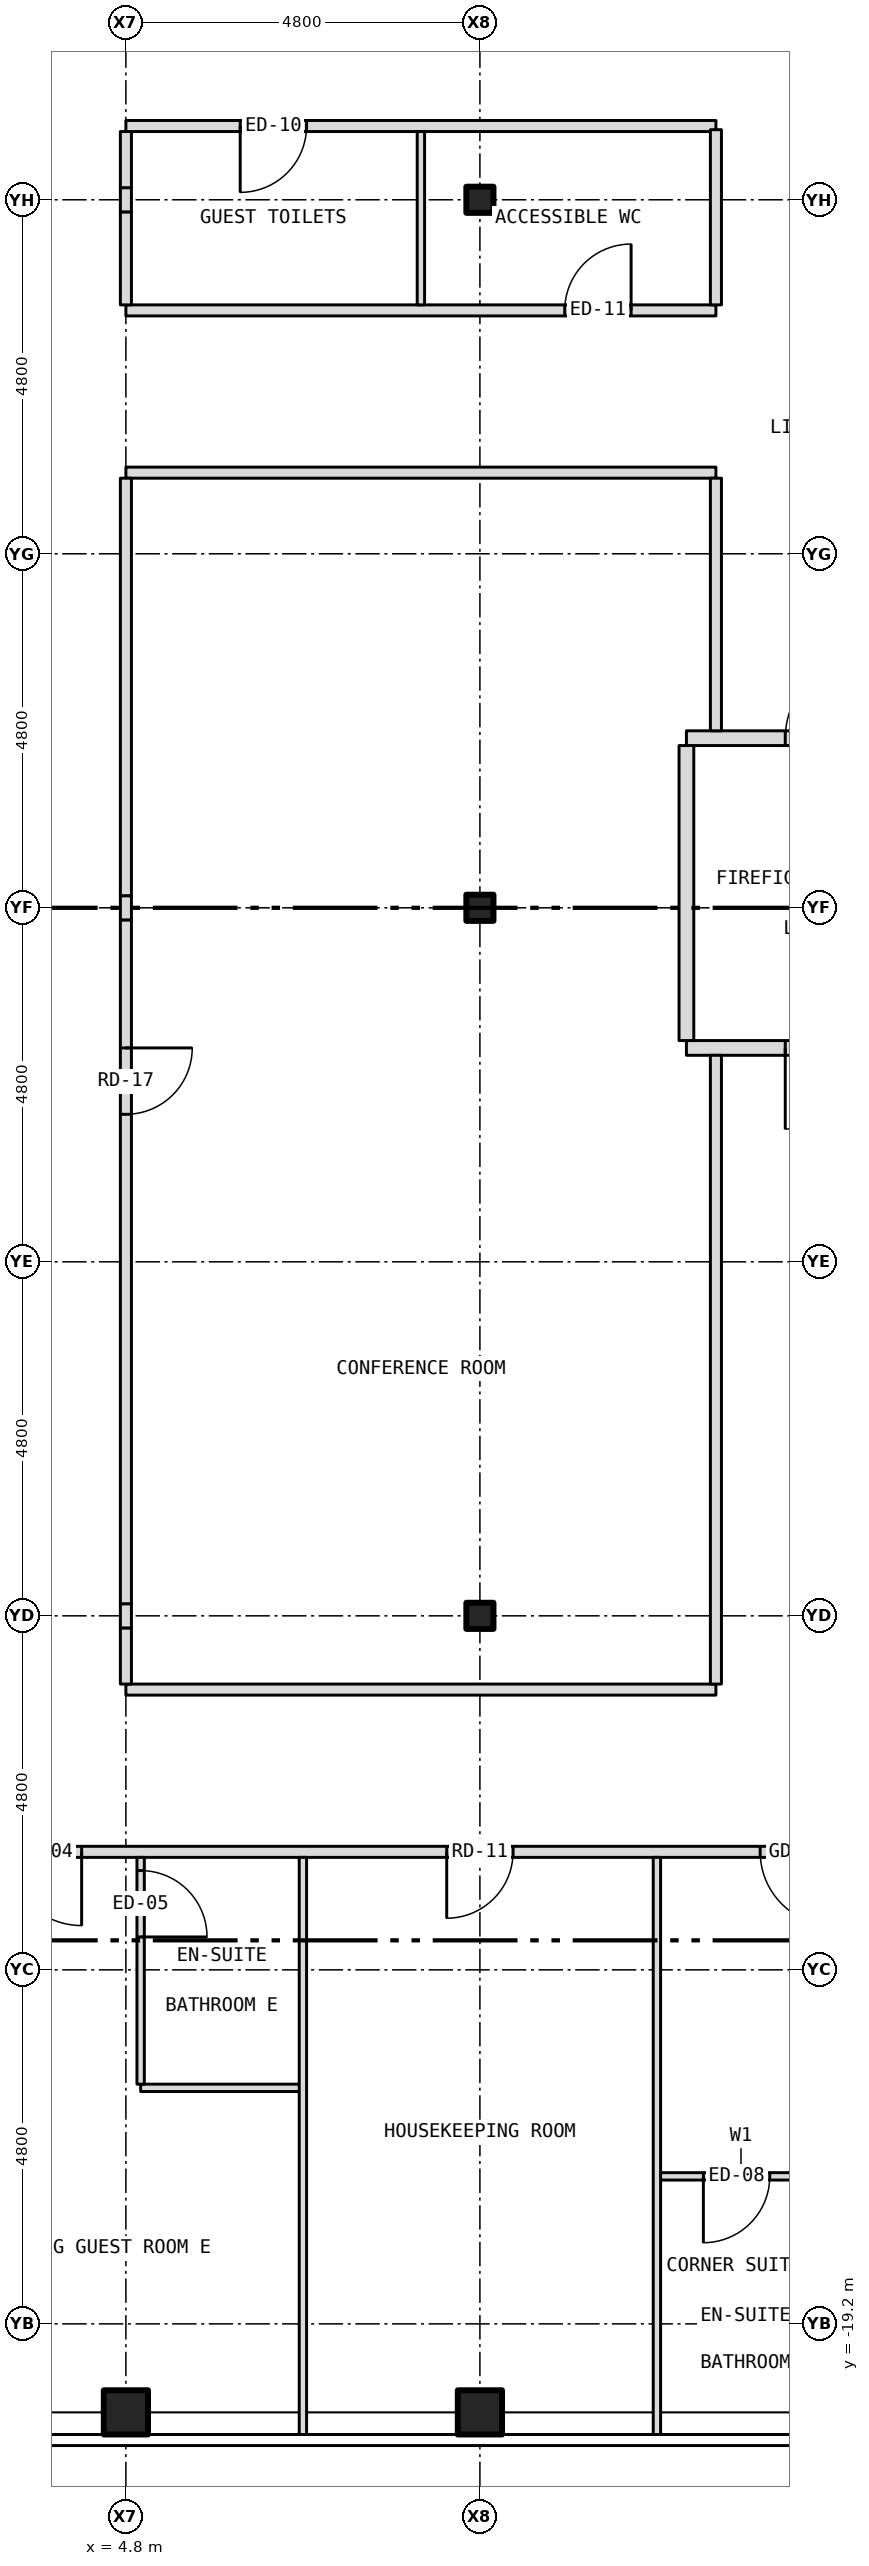
"""IFC4 building model, lengths in metres.
Left out: names, types, materials, properties, quantities, classifications, styles, units other than length and angle.
Written with IfcOpenShell. Run it as: python <this file> out.ifc"""

import sys

from ifc_helpers import new_model, si_unit, direction, frame, frame_2d, origin, origin_2d, place, context, subcontext, project, spatial, rectangle, hollow_rectangle, i_section, extrude, element, fill, save


model = new_model("IFC4")
c1 = context("Model", 3, precision=1e-05, world=origin(), true_north=direction((0.0, 1.0)))
c2 = subcontext(c1, "Body", "Model", "MODEL_VIEW")
j1 = project(units=[si_unit("LENGTHUNIT", "METRE"), si_unit("PLANEANGLEUNIT", "RADIAN")], contexts=[c1])
p1 = place(None, origin())
s1 = spatial("IfcSite", under=j1, at=p1, CompositionType="ELEMENT")
p2 = place(p1, origin())
s2 = spatial("IfcBuilding", under=s1, at=p2, CompositionType="ELEMENT")
p3 = place(p2, frame((0.0, 0.0, 255.0)))
s3 = spatial("IfcBuildingStorey", under=s2, at=p3, CompositionType="ELEMENT", Elevation=255.0)
for number, where, z_axis, x_axis in (
    (1, (4.8, -20.4, -0.15), (0.0, 0.0, 1.0), (1.0, 0.0, 0.0)),
    (2, (9.6, -20.4, -0.15), (0.0, 0.0, 1.0), (1.0, 0.0, 0.0)),
):
    element("IfcColumn", number, at=place(p3, frame(where, z_axis=z_axis, x_axis=x_axis)), inside=s3, PredefinedType="COLUMN", context=c2, shape_type="SweptSolid", body=[
        extrude(hollow_rectangle(XDim=0.6, YDim=0.6, WallThickness=0.03, at=origin_2d()), origin(), (0.0, 0.0, 1.0), 3.5),
    ])
for number, where, z_axis, x_axis in (
    (3, (9.6, -9.6, -0.15), (0.0, 0.0, 1.0), (1.0, 0.0, 0.0)),
    (4, (9.6, 0.0, -0.15), (0.0, 0.0, 1.0), (1.0, 0.0, 0.0)),
    (5, (9.6, 9.6, -0.15), (0.0, 0.0, 1.0), (1.0, 0.0, 0.0)),
):
    element("IfcColumn", number, at=place(p3, frame(where, z_axis=z_axis, x_axis=x_axis)), inside=s3, PredefinedType="COLUMN", context=c2, shape_type="SweptSolid", body=[
        extrude(i_section(OverallWidth=0.368, OverallDepth=0.356, WebThickness=0.011, FlangeThickness=0.018, at=origin_2d()), origin(), (0.0, 0.0, 1.0), 3.5),
    ])
p4 = place(p3, frame((12.0, -17.2, 0.0), z_axis=(0.0, 0.0, 1.0), x_axis=(1.0, 0.0, 0.0)))
e6 = element("IfcWall", 6, at=p4, inside=s3, PredefinedType="PARTITIONING", context=c2, shape_type="SweptSolid", body=[
    extrude(rectangle(XDim=2.28, YDim=0.1, at=frame_2d((1.14, 0.0))), origin(), (0.0, 0.0, 1.0), 3.35),
])
p5 = place(p4, frame((0.63, 0.0, 0.0)))
e7 = element("IfcOpeningElement", 7, at=p5, cuts=e6, PredefinedType="OPENING", context=c2, shape_type="SweptSolid", body=[
    extrude(rectangle(XDim=0.9, YDim=2.1, at=frame_2d((0.45, 1.05))), frame((0.0, 0.062, 0.0), z_axis=(0.0, -1.0, 0.0), x_axis=(1.0, 0.0, 0.0)), (0.0, 0.0, 1.0), 0.124),
])
p6 = place(p3, frame((5.0, -16.0, 0.0), z_axis=(0.0, 0.0, 1.0), x_axis=(1.0, 0.0, 0.0)))
e8 = element("IfcWall", 8, at=p6, inside=s3, PredefinedType="PARTITIONING", context=c2, shape_type="SweptSolid", body=[
    extrude(rectangle(XDim=2.2, YDim=0.1, at=frame_2d((1.1, 0.0))), origin(), (0.0, 0.0, 1.0), 3.35),
])
p7 = place(p3, frame((-15.8, -12.8, 0.0), z_axis=(0.0, 0.0, 1.0), x_axis=(1.0, 0.0, 0.0)))
e9 = element("IfcWall", 9, at=p7, inside=s3, PredefinedType="PARTITIONING", context=c2, shape_type="SweptSolid", body=[
    extrude(rectangle(XDim=31.6, YDim=0.15, at=frame_2d((15.8, 0.0))), origin(), (0.0, 0.0, 1.0), 3.35),
])
p8 = place(p7, frame((10.55, 0.0, 0.0)))
e10 = element("IfcOpeningElement", 10, at=p8, cuts=e9, PredefinedType="OPENING", context=c2, shape_type="SweptSolid", body=[
    extrude(rectangle(XDim=0.9, YDim=2.1, at=frame_2d((0.45, 1.05))), frame((0.0, 0.087, 0.0), z_axis=(0.0, -1.0, 0.0), x_axis=(1.0, 0.0, 0.0)), (0.0, 0.0, 1.0), 0.174),
])
p9 = place(p7, frame((19.0, 0.0, 0.0)))
e11 = element("IfcOpeningElement", 11, at=p9, cuts=e9, PredefinedType="OPENING", context=c2, shape_type="SweptSolid", body=[
    extrude(rectangle(XDim=1.0, YDim=2.1, at=frame_2d((0.5, 1.05))), frame((0.0, 0.087, 0.0), z_axis=(0.0, -1.0, 0.0), x_axis=(1.0, 0.0, 0.0)), (0.0, 0.0, 1.0), 0.174),
])
p10 = place(p7, frame((24.95, 0.0, 0.0)))
e12 = element("IfcOpeningElement", 12, at=p10, cuts=e9, PredefinedType="OPENING", context=c2, shape_type="SweptSolid", body=[
    extrude(rectangle(XDim=0.9, YDim=2.1, at=frame_2d((0.45, 1.05))), frame((0.0, 0.087, 0.0), z_axis=(0.0, -1.0, 0.0), x_axis=(1.0, 0.0, 0.0)), (0.0, 0.0, 1.0), 0.174),
])
p11 = place(p7, frame((1.4, 0.0, 0.0)))
e13 = element("IfcOpeningElement", 13, at=p11, cuts=e9, PredefinedType="OPENING", context=c2, shape_type="SweptSolid", body=[
    extrude(rectangle(XDim=1.0, YDim=2.1, at=frame_2d((0.5, 1.05))), frame((0.0, 0.087, 0.0), z_axis=(0.0, -1.0, 0.0), x_axis=(1.0, 0.0, 0.0)), (0.0, 0.0, 1.0), 0.174),
])
p12 = place(p7, frame((29.2, 0.0, 0.0)))
e14 = element("IfcOpeningElement", 14, at=p12, cuts=e9, PredefinedType="OPENING", context=c2, shape_type="SweptSolid", body=[
    extrude(rectangle(XDim=1.0, YDim=2.1, at=frame_2d((0.5, 1.05))), frame((0.0, 0.087, 0.0), z_axis=(0.0, -1.0, 0.0), x_axis=(1.0, 0.0, 0.0)), (0.0, 0.0, 1.0), 0.174),
])
p13 = place(p3, frame((4.8, -10.6, 0.0), z_axis=(0.0, 0.0, 1.0), x_axis=(1.0, 0.0, 0.0)))
e15 = element("IfcWall", 15, at=p13, inside=s3, PredefinedType="PARTITIONING", context=c2, shape_type="SweptSolid", body=[
    extrude(rectangle(XDim=8.0, YDim=0.15, at=frame_2d((4.0, 0.0))), origin(), (0.0, 0.0, 1.0), 3.35),
])
p14 = place(p3, frame((12.4, -1.9, 0.0), z_axis=(0.0, 0.0, 1.0), x_axis=(1.0, 0.0, 0.0)))
e16 = element("IfcWall", 16, at=p14, inside=s3, PredefinedType="PARTITIONING", context=c2, shape_type="SweptSolid", body=[
    extrude(rectangle(XDim=3.28, YDim=0.2, at=frame_2d((1.64, 0.0))), origin(), (0.0, 0.0, 1.0), 3.35),
])
p15 = place(p14, frame((1.34, 0.0, 0.0)))
e17 = element("IfcOpeningElement", 17, at=p15, cuts=e16, PredefinedType="OPENING", context=c2, shape_type="SweptSolid", body=[
    extrude(rectangle(XDim=1.1, YDim=2.1, at=frame_2d((0.55, 1.05))), frame((0.0, 0.112, 0.0), z_axis=(0.0, -1.0, 0.0), x_axis=(1.0, 0.0, 0.0)), (0.0, 0.0, 1.0), 0.224),
])
p16 = place(p3, frame((12.4, 2.3, 0.0), z_axis=(0.0, 0.0, 1.0), x_axis=(1.0, 0.0, 0.0)))
e18 = element("IfcWall", 18, at=p16, inside=s3, PredefinedType="PARTITIONING", context=c2, shape_type="SweptSolid", body=[
    extrude(rectangle(XDim=3.28, YDim=0.2, at=frame_2d((1.64, 0.0))), origin(), (0.0, 0.0, 1.0), 3.35),
])
p17 = place(p16, frame((1.34, 0.0, 0.0)))
e19 = element("IfcOpeningElement", 19, at=p17, cuts=e18, PredefinedType="OPENING", context=c2, shape_type="SweptSolid", body=[
    extrude(rectangle(XDim=1.1, YDim=2.1, at=frame_2d((0.55, 1.05))), frame((0.0, 0.112, 0.0), z_axis=(0.0, -1.0, 0.0), x_axis=(1.0, 0.0, 0.0)), (0.0, 0.0, 1.0), 0.224),
])
p18 = place(p3, frame((4.8, 5.9, 0.0), z_axis=(0.0, 0.0, 1.0), x_axis=(1.0, 0.0, 0.0)))
e20 = element("IfcWall", 20, at=p18, inside=s3, PredefinedType="PARTITIONING", context=c2, shape_type="SweptSolid", body=[
    extrude(rectangle(XDim=8.0, YDim=0.15, at=frame_2d((4.0, 0.0))), origin(), (0.0, 0.0, 1.0), 3.35),
])
p19 = place(p3, frame((4.8, 8.1, 0.0), z_axis=(0.0, 0.0, 1.0), x_axis=(1.0, 0.0, 0.0)))
e21 = element("IfcWall", 21, at=p19, inside=s3, PredefinedType="PARTITIONING", context=c2, shape_type="SweptSolid", body=[
    extrude(rectangle(XDim=8.0, YDim=0.15, at=frame_2d((4.0, 0.0))), origin(), (0.0, 0.0, 1.0), 3.35),
])
p20 = place(p19, frame((5.95, 0.0, 0.0)))
e22 = element("IfcOpeningElement", 22, at=p20, cuts=e21, PredefinedType="OPENING", context=c2, shape_type="SweptSolid", body=[
    extrude(rectangle(XDim=0.9, YDim=2.1, at=frame_2d((0.45, 1.05))), frame((0.0, 0.087, 0.0), z_axis=(0.0, -1.0, 0.0), x_axis=(1.0, 0.0, 0.0)), (0.0, 0.0, 1.0), 0.174),
])
p21 = place(p3, frame((4.8, 10.6, 0.0), z_axis=(0.0, 0.0, 1.0), x_axis=(1.0, 0.0, 0.0)))
e23 = element("IfcWall", 23, at=p21, inside=s3, PredefinedType="PARTITIONING", context=c2, shape_type="SweptSolid", body=[
    extrude(rectangle(XDim=8.0, YDim=0.15, at=frame_2d((4.0, 0.0))), origin(), (0.0, 0.0, 1.0), 3.35),
])
p22 = place(p21, frame((1.55, 0.0, 0.0)))
e24 = element("IfcOpeningElement", 24, at=p22, cuts=e23, PredefinedType="OPENING", context=c2, shape_type="SweptSolid", body=[
    extrude(rectangle(XDim=0.9, YDim=2.1, at=frame_2d((0.45, 1.05))), frame((0.0, 0.087, 0.0), z_axis=(0.0, -1.0, 0.0), x_axis=(1.0, 0.0, 0.0)), (0.0, 0.0, 1.0), 0.174),
])
p23 = place(p3, frame((4.8, -10.525, 0.0), z_axis=(0.0, 0.0, 1.0), x_axis=(0.0, 1.0, 0.0)))
e25 = element("IfcWall", 25, at=p23, inside=s3, PredefinedType="PARTITIONING", context=c2, shape_type="SweptSolid", body=[
    extrude(rectangle(XDim=0.761, YDim=0.15, at=frame_2d((0.38, 0.0))), origin(), (0.0, 0.0, 1.0), 2.817),
])
p24 = place(p3, frame((4.8, -9.764, 0.0), z_axis=(0.0, 0.0, 1.0), x_axis=(0.0, 1.0, 0.0)))
e26 = element("IfcWall", 26, at=p24, inside=s3, PredefinedType="PARTITIONING", context=c2, shape_type="SweptSolid", body=[
    extrude(rectangle(XDim=0.328, YDim=0.15, at=frame_2d((0.164, 0.0))), origin(), (0.0, 0.0, 1.0), 3.35),
])
p25 = place(p3, frame((4.8, -9.436, 0.0), z_axis=(0.0, 0.0, 1.0), x_axis=(0.0, 1.0, 0.0)))
e27 = element("IfcWall", 27, at=p25, inside=s3, PredefinedType="PARTITIONING", context=c2, shape_type="SweptSolid", body=[
    extrude(rectangle(XDim=9.272, YDim=0.15, at=frame_2d((4.636, 0.0))), origin(), (0.0, 0.0, 1.0), 2.817),
])
p26 = place(p25, frame((6.636, 0.0, 0.0)))
e28 = element("IfcOpeningElement", 28, at=p26, cuts=e27, PredefinedType="OPENING", context=c2, shape_type="SweptSolid", body=[
    extrude(rectangle(XDim=0.9, YDim=2.1, at=frame_2d((0.45, 1.05))), frame((0.0, 0.087, 0.0), z_axis=(0.0, -1.0, 0.0), x_axis=(1.0, 0.0, 0.0)), (0.0, 0.0, 1.0), 0.174),
])
p27 = place(p3, frame((4.8, -0.164, 0.0), z_axis=(0.0, 0.0, 1.0), x_axis=(0.0, 1.0, 0.0)))
e29 = element("IfcWall", 29, at=p27, inside=s3, PredefinedType="PARTITIONING", context=c2, shape_type="SweptSolid", body=[
    extrude(rectangle(XDim=0.328, YDim=0.15, at=frame_2d((0.164, 0.0))), origin(), (0.0, 0.0, 1.0), 3.35),
])
p28 = place(p3, frame((4.8, 0.164, 0.0), z_axis=(0.0, 0.0, 1.0), x_axis=(0.0, 1.0, 0.0)))
e30 = element("IfcWall", 30, at=p28, inside=s3, PredefinedType="PARTITIONING", context=c2, shape_type="SweptSolid", body=[
    extrude(rectangle(XDim=5.661, YDim=0.15, at=frame_2d((2.831, 0.0))), origin(), (0.0, 0.0, 1.0), 2.817),
])
p29 = place(p3, frame((4.8, 8.175, 0.0), z_axis=(0.0, 0.0, 1.0), x_axis=(0.0, 1.0, 0.0)))
e31 = element("IfcWall", 31, at=p29, inside=s3, PredefinedType="PARTITIONING", context=c2, shape_type="SweptSolid", body=[
    extrude(rectangle(XDim=1.261, YDim=0.15, at=frame_2d((0.63, 0.0))), origin(), (0.0, 0.0, 1.0), 2.817),
])
p30 = place(p3, frame((4.8, 9.436, 0.0), z_axis=(0.0, 0.0, 1.0), x_axis=(0.0, 1.0, 0.0)))
e32 = element("IfcWall", 32, at=p30, inside=s3, PredefinedType="PARTITIONING", context=c2, shape_type="SweptSolid", body=[
    extrude(rectangle(XDim=0.328, YDim=0.15, at=frame_2d((0.164, 0.0))), origin(), (0.0, 0.0, 1.0), 3.35),
])
p31 = place(p3, frame((4.8, 9.764, 0.0), z_axis=(0.0, 0.0, 1.0), x_axis=(0.0, 1.0, 0.0)))
e33 = element("IfcWall", 33, at=p31, inside=s3, PredefinedType="PARTITIONING", context=c2, shape_type="SweptSolid", body=[
    extrude(rectangle(XDim=0.761, YDim=0.15, at=frame_2d((0.38, 0.0))), origin(), (0.0, 0.0, 1.0), 2.817),
])
p32 = place(p3, frame((5.0, -15.95, 0.0), z_axis=(0.0, 0.0, 1.0), x_axis=(0.0, 1.0, 0.0)))
e34 = element("IfcWall", 34, at=p32, inside=s3, PredefinedType="PARTITIONING", context=c2, shape_type="SweptSolid", body=[
    extrude(rectangle(XDim=3.075, YDim=0.1, at=frame_2d((1.538, 0.0))), origin(), (0.0, 0.0, 1.0), 3.35),
])
p33 = place(p32, frame((1.996, 0.0, 0.0)))
e35 = element("IfcOpeningElement", 35, at=p33, cuts=e34, PredefinedType="OPENING", context=c2, shape_type="SweptSolid", body=[
    extrude(rectangle(XDim=0.9, YDim=2.1, at=frame_2d((0.45, 1.05))), frame((0.0, 0.062, 0.0), z_axis=(0.0, -1.0, 0.0), x_axis=(1.0, 0.0, 0.0)), (0.0, 0.0, 1.0), 0.124),
])
p34 = place(p3, frame((7.2, -20.73, 0.0), z_axis=(0.0, 0.0, 1.0), x_axis=(0.0, 1.0, 0.0)))
e36 = element("IfcWall", 36, at=p34, inside=s3, PredefinedType="PARTITIONING", context=c2, shape_type="SweptSolid", body=[
    extrude(rectangle(XDim=7.855, YDim=0.1, at=frame_2d((3.927, 0.0))), origin(), (0.0, 0.0, 1.0), 3.35),
])
p35 = place(p3, frame((8.8, 8.175, 0.0), z_axis=(0.0, 0.0, 1.0), x_axis=(0.0, 1.0, 0.0)))
e37 = element("IfcWall", 37, at=p35, inside=s3, PredefinedType="PARTITIONING", context=c2, shape_type="SweptSolid", body=[
    extrude(rectangle(XDim=2.35, YDim=0.1, at=frame_2d((1.175, 0.0))), origin(), (0.0, 0.0, 1.0), 3.35),
])
p36 = place(p3, frame((12.0, -20.73, 0.0), z_axis=(0.0, 0.0, 1.0), x_axis=(0.0, 1.0, 0.0)))
e38 = element("IfcWall", 38, at=p36, inside=s3, PredefinedType="PARTITIONING", context=c2, shape_type="SweptSolid", body=[
    extrude(rectangle(XDim=7.855, YDim=0.1, at=frame_2d((3.927, 0.0))), origin(), (0.0, 0.0, 1.0), 3.35),
])
p37 = place(p3, frame((12.4, -1.8, 0.0), z_axis=(0.0, 0.0, 1.0), x_axis=(0.0, 1.0, 0.0)))
e39 = element("IfcWall", 39, at=p37, inside=s3, PredefinedType="PARTITIONING", context=c2, shape_type="SweptSolid", body=[
    extrude(rectangle(XDim=4.0, YDim=0.2, at=frame_2d((2.0, 0.0))), origin(), (0.0, 0.0, 1.0), 3.35),
])
p38 = place(p3, frame((12.8, -10.525, 0.0), z_axis=(0.0, 0.0, 1.0), x_axis=(0.0, 1.0, 0.0)))
e40 = element("IfcWall", 40, at=p38, inside=s3, PredefinedType="PARTITIONING", context=c2, shape_type="SweptSolid", body=[
    extrude(rectangle(XDim=8.525, YDim=0.15, at=frame_2d((4.262, 0.0))), origin(), (0.0, 0.0, 1.0), 3.35),
])
p39 = place(p3, frame((12.8, 2.4, 0.0), z_axis=(0.0, 0.0, 1.0), x_axis=(0.0, 1.0, 0.0)))
e41 = element("IfcWall", 41, at=p39, inside=s3, PredefinedType="PARTITIONING", context=c2, shape_type="SweptSolid", body=[
    extrude(rectangle(XDim=3.425, YDim=0.15, at=frame_2d((1.712, 0.0))), origin(), (0.0, 0.0, 1.0), 3.35),
])
p40 = place(p3, frame((12.8, 8.175, 0.0), z_axis=(0.0, 0.0, 1.0), x_axis=(0.0, 1.0, 0.0)))
e42 = element("IfcWall", 42, at=p40, inside=s3, PredefinedType="PARTITIONING", context=c2, shape_type="SweptSolid", body=[
    extrude(rectangle(XDim=2.375, YDim=0.15, at=frame_2d((1.188, 0.0))), origin(), (0.0, 0.0, 1.0), 3.35),
])
p41 = place(p17, origin())
e43 = element("IfcDoor", 43, at=p41, inside=s3, OperationType="SINGLE_SWING_RIGHT", PredefinedType="DOOR", context=c2, shape_type="SweptSolid", body=[
    extrude(rectangle(XDim=1.1, YDim=2.1, at=frame_2d((0.55, 1.05))), frame((0.0, 0.025, 0.0), z_axis=(0.0, -1.0, 0.0), x_axis=(1.0, 0.0, 0.0)), (0.0, 0.0, 1.0), 0.05),
])
fill(e19, e43)
p42 = place(p15, origin())
e44 = element("IfcDoor", 44, at=p42, inside=s3, OperationType="SINGLE_SWING_LEFT", PredefinedType="DOOR", context=c2, shape_type="SweptSolid", body=[
    extrude(rectangle(XDim=1.1, YDim=2.1, at=frame_2d((0.55, 1.05))), frame((0.0, 0.025, 0.0), z_axis=(0.0, -1.0, 0.0), x_axis=(1.0, 0.0, 0.0)), (0.0, 0.0, 1.0), 0.05),
])
fill(e17, e44)
p43 = place(p9, origin())
e45 = element("IfcDoor", 45, at=p43, inside=s3, OperationType="SINGLE_SWING_RIGHT", PredefinedType="DOOR", context=c2, shape_type="SweptSolid", body=[
    extrude(rectangle(XDim=1.0, YDim=2.1, at=frame_2d((0.5, 1.05))), frame((0.0, 0.025, 0.0), z_axis=(0.0, -1.0, 0.0), x_axis=(1.0, 0.0, 0.0)), (0.0, 0.0, 1.0), 0.05),
])
fill(e11, e45)
p44 = place(p33, origin())
e46 = element("IfcDoor", 46, at=p44, inside=s3, OperationType="SINGLE_SWING_LEFT", PredefinedType="DOOR", context=c2, shape_type="SweptSolid", body=[
    extrude(rectangle(XDim=0.9, YDim=2.1, at=frame_2d((0.45, 1.05))), frame((0.0, 0.025, 0.0), z_axis=(0.0, -1.0, 0.0), x_axis=(1.0, 0.0, 0.0)), (0.0, 0.0, 1.0), 0.05),
])
fill(e35, e46)
p45 = place(p10, origin())
e47 = element("IfcDoor", 47, at=p45, inside=s3, OperationType="SINGLE_SWING_LEFT", PredefinedType="DOOR", context=c2, shape_type="SweptSolid", body=[
    extrude(rectangle(XDim=0.9, YDim=2.1, at=frame_2d((0.45, 1.05))), frame((0.0, 0.025, 0.0), z_axis=(0.0, -1.0, 0.0), x_axis=(1.0, 0.0, 0.0)), (0.0, 0.0, 1.0), 0.05),
])
fill(e12, e47)
p46 = place(p5, origin())
e48 = element("IfcDoor", 48, at=p46, inside=s3, OperationType="SINGLE_SWING_LEFT", PredefinedType="DOOR", context=c2, shape_type="SweptSolid", body=[
    extrude(rectangle(XDim=0.9, YDim=2.1, at=frame_2d((0.45, 1.05))), frame((0.0, 0.025, 0.0), z_axis=(0.0, -1.0, 0.0), x_axis=(1.0, 0.0, 0.0)), (0.0, 0.0, 1.0), 0.05),
])
fill(e7, e48)
p47 = place(p12, origin())
e49 = element("IfcDoor", 49, at=p47, inside=s3, OperationType="SINGLE_SWING_RIGHT", PredefinedType="DOOR", context=c2, shape_type="SweptSolid", body=[
    extrude(rectangle(XDim=1.0, YDim=2.1, at=frame_2d((0.5, 1.05))), frame((0.0, 0.025, 0.0), z_axis=(0.0, -1.0, 0.0), x_axis=(1.0, 0.0, 0.0)), (0.0, 0.0, 1.0), 0.05),
])
fill(e14, e49)
p48 = place(p22, origin())
e50 = element("IfcDoor", 50, at=p48, inside=s3, OperationType="SINGLE_SWING_LEFT", PredefinedType="DOOR", context=c2, shape_type="SweptSolid", body=[
    extrude(rectangle(XDim=0.9, YDim=2.1, at=frame_2d((0.45, 1.05))), frame((0.0, 0.025, 0.0), z_axis=(0.0, -1.0, 0.0), x_axis=(1.0, 0.0, 0.0)), (0.0, 0.0, 1.0), 0.05),
])
fill(e24, e50)
p49 = place(p20, origin())
e51 = element("IfcDoor", 51, at=p49, inside=s3, OperationType="SINGLE_SWING_RIGHT", PredefinedType="DOOR", context=c2, shape_type="SweptSolid", body=[
    extrude(rectangle(XDim=0.9, YDim=2.1, at=frame_2d((0.45, 1.05))), frame((0.0, 0.025, 0.0), z_axis=(0.0, -1.0, 0.0), x_axis=(1.0, 0.0, 0.0)), (0.0, 0.0, 1.0), 0.05),
])
fill(e22, e51)
p50 = place(p26, origin())
e52 = element("IfcDoor", 52, at=p50, inside=s3, OperationType="SINGLE_SWING_RIGHT", PredefinedType="DOOR", context=c2, shape_type="SweptSolid", body=[
    extrude(rectangle(XDim=0.9, YDim=2.1, at=frame_2d((0.45, 1.05))), frame((0.0, 0.025, 0.0), z_axis=(0.0, -1.0, 0.0), x_axis=(1.0, 0.0, 0.0)), (0.0, 0.0, 1.0), 0.05),
])
fill(e28, e52)
save(model, sys.argv[1])
